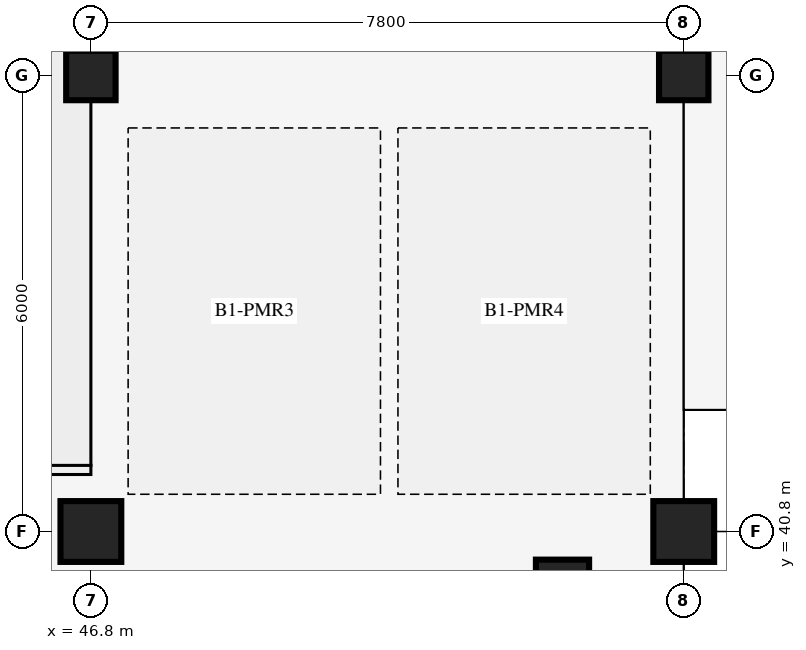
"""IFC4 building model, lengths in metres.
Left out: names, types, materials, properties, quantities, classifications, styles, units other than length and angle.
Written with IfcOpenShell. Run it as: python <this file> out.ifc"""

import sys

from ifc_helpers import new_model, si_unit, direction, frame, origin, origin_2d, place, context, subcontext, project, spatial, rectangle, extrude, element, save


model = new_model("IFC4")
c1 = context("Model", 3, precision=1e-05, world=origin(), true_north=direction((0.0, 1.0)))
c2 = subcontext(c1, "Body", "Model", "MODEL_VIEW")
j1 = project(units=[si_unit("LENGTHUNIT", "METRE"), si_unit("PLANEANGLEUNIT", "RADIAN")], contexts=[c1])
p1 = place(None, origin())
s1 = spatial("IfcSite", under=j1, at=p1, CompositionType="ELEMENT")
p2 = place(p1, origin())
s2 = spatial("IfcBuilding", under=s1, at=p2, CompositionType="ELEMENT")
p3 = place(p2, frame((0.0, 0.0, -4.8)))
s3 = spatial("IfcBuildingStorey", under=s2, at=p3, CompositionType="ELEMENT", Elevation=-4.8)
p4 = place(p3, frame((46.8, 40.8, 0.0), z_axis=(0.0, 0.0, 1.0), x_axis=(1.0, 0.0, 0.0)))
e1 = element("IfcColumn", 1, at=p4, inside=s3, PredefinedType="COLUMN", context=c2, shape_type="SweptSolid", body=[
    extrude(rectangle(XDim=0.8, YDim=0.8, at=origin_2d()), origin(), (0.0, 0.0, 1.0), 4.8),
])
p5 = place(p3, frame((46.8, 46.8, 0.0), z_axis=(0.0, 0.0, 1.0), x_axis=(1.0, 0.0, 0.0)))
e2 = element("IfcColumn", 2, at=p5, inside=s3, PredefinedType="COLUMN", context=c2, shape_type="SweptSolid", body=[
    extrude(rectangle(XDim=0.65, YDim=0.65, at=origin_2d()), origin(), (0.0, 0.0, 1.0), 4.8),
])
p6 = place(p3, frame((54.6, 40.8, 0.0), z_axis=(0.0, 0.0, 1.0), x_axis=(1.0, 0.0, 0.0)))
e3 = element("IfcColumn", 3, at=p6, inside=s3, PredefinedType="COLUMN", context=c2, shape_type="SweptSolid", body=[
    extrude(rectangle(XDim=0.8, YDim=0.8, at=origin_2d()), origin(), (0.0, 0.0, 1.0), 4.8),
])
p7 = place(p3, frame((53.005, 40.08, 0.0), z_axis=(0.0, 0.0, 1.0), x_axis=(1.0, 0.0, 0.0)))
e4 = element("IfcColumn", 4, at=p7, inside=s3, PredefinedType="COLUMN", context=c2, shape_type="SweptSolid", body=[
    extrude(rectangle(XDim=0.7, YDim=0.7, at=origin_2d()), origin(), (0.0, 0.0, 1.0), 4.755),
])
p8 = place(p3, frame((54.6, 46.8, 0.0), z_axis=(0.0, 0.0, 1.0), x_axis=(1.0, 0.0, 0.0)))
e5 = element("IfcColumn", 5, at=p8, inside=s3, PredefinedType="COLUMN", context=c2, shape_type="SweptSolid", body=[
    extrude(rectangle(XDim=0.65, YDim=0.65, at=origin_2d()), origin(), (0.0, 0.0, 1.0), 4.8),
])
save(model, sys.argv[1])
